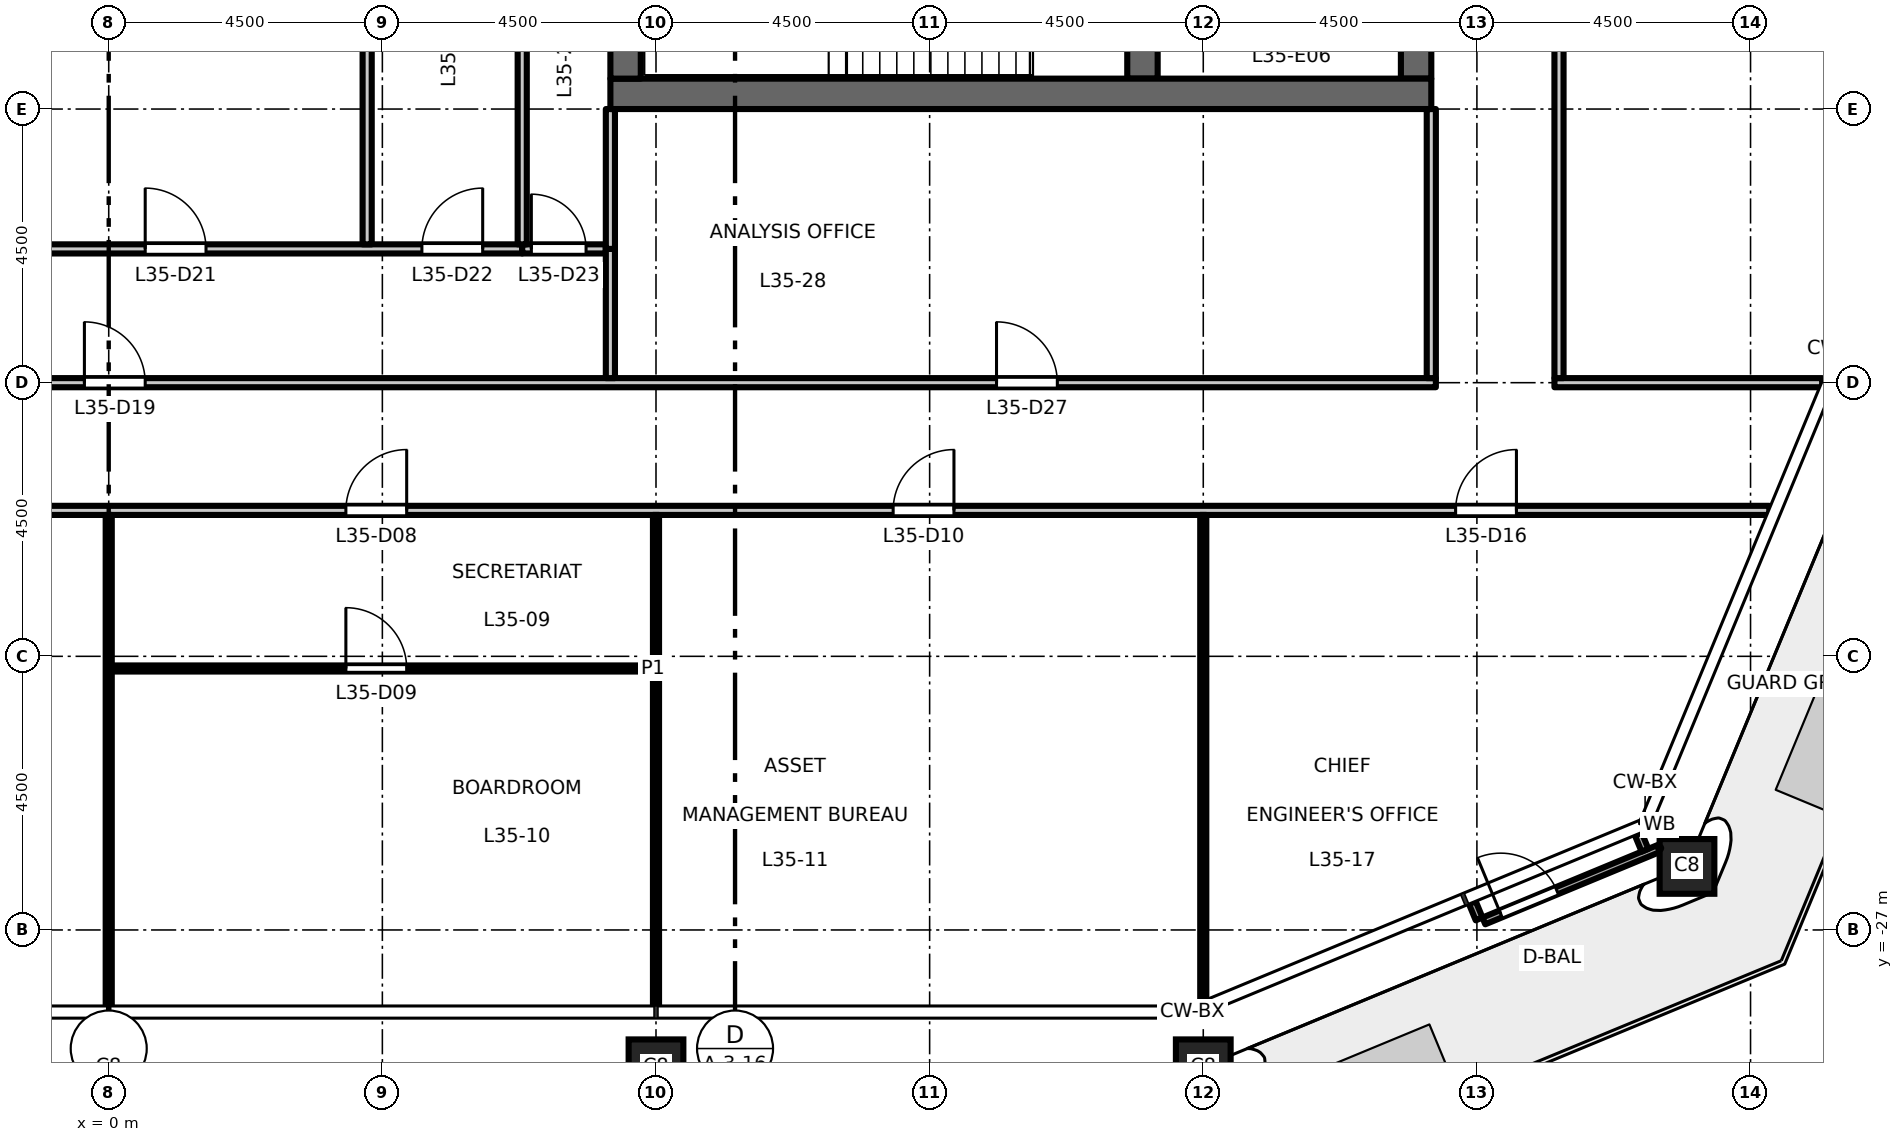
"""IFC4 building model, lengths in metres.
Left out: names, types, materials, properties, quantities, classifications, styles, units other than length and angle.
Written with IfcOpenShell. Run it as: python <this file> out.ifc"""

import sys

from ifc_helpers import new_model, si_unit, direction, frame, frame_2d, origin, origin_2d, place, context, subcontext, project, spatial, rectangle, hollow_rectangle, extrude, element, fill, save


model = new_model("IFC4")
c1 = context("Model", 3, precision=1e-05, world=origin(), true_north=direction((0.0, 1.0)))
c2 = subcontext(c1, "Body", "Model", "MODEL_VIEW")
j1 = project(units=[si_unit("LENGTHUNIT", "METRE"), si_unit("PLANEANGLEUNIT", "RADIAN")], contexts=[c1])
p1 = place(None, origin())
s1 = spatial("IfcSite", under=j1, at=p1, CompositionType="ELEMENT")
p2 = place(p1, origin())
s2 = spatial("IfcBuilding", under=s1, at=p2, CompositionType="ELEMENT")
p3 = place(p2, frame((0.0, 0.0, 163.2)))
s3 = spatial("IfcBuildingStorey", under=s2, at=p3, CompositionType="ELEMENT", Elevation=163.2)
for number, where, z_axis, x_axis in (
    (1, (0.0, -29.25, 0.0), (0.0, 0.0, 1.0), (1.0, 0.0, 0.0)),
    (2, (9.0, -29.25, 0.0), (0.0, 0.0, 1.0), (1.0, 0.0, 0.0)),
    (3, (18.0, -29.25, 0.0), (0.0, 0.0, 1.0), (1.0, 0.0, 0.0)),
    (4, (25.955, -25.955, 0.0), (0.0, 0.0, 1.0), (1.0, 0.0, 0.0)),
):
    element("IfcColumn", number, at=place(p3, frame(where, z_axis=z_axis, x_axis=x_axis)), inside=s3, PredefinedType="COLUMN", context=c2, shape_type="SweptSolid", body=[
        extrude(hollow_rectangle(XDim=0.9, YDim=0.9, WallThickness=0.05, at=origin_2d()), origin(), (0.0, 0.0, 1.0), 4.5),
    ])
p4 = place(p3, frame((21.5, -13.0, 0.0), z_axis=(0.0, 0.0, 1.0), x_axis=(0.0, 1.0, 0.0)))
e5 = element("IfcWall", 5, at=p4, inside=s3, PredefinedType="SHEAR", context=c2, shape_type="SweptSolid", body=[
    extrude(rectangle(XDim=26.0, YDim=0.5, at=frame_2d((13.0, 0.0))), origin(), (0.0, 0.0, 1.0), 4.35),
])
p5 = place(p4, frame((16.825, 0.0, 0.0)))
e6 = element("IfcOpeningElement", 6, at=p5, cuts=e5, PredefinedType="OPENING", context=c2, shape_type="SweptSolid", body=[
    extrude(rectangle(XDim=1.8, YDim=2.1, at=frame_2d((0.9, 1.05))), frame((0.0, 0.26, 0.0), z_axis=(0.0, -1.0, 0.0), x_axis=(1.0, 0.0, 0.0)), (0.0, 0.0, 1.0), 0.52),
])
p6 = place(p4, frame((7.375, 0.0, 0.0)))
e7 = element("IfcOpeningElement", 7, at=p6, cuts=e5, PredefinedType="OPENING", context=c2, shape_type="SweptSolid", body=[
    extrude(rectangle(XDim=1.8, YDim=2.1, at=frame_2d((0.9, 1.05))), frame((0.0, 0.26, 0.0), z_axis=(0.0, -1.0, 0.0), x_axis=(1.0, 0.0, 0.0)), (0.0, 0.0, 1.0), 0.52),
])
p7 = place(p4, frame((22.45, 0.0, 0.0)))
e8 = element("IfcOpeningElement", 8, at=p7, cuts=e5, PredefinedType="OPENING", context=c2, shape_type="SweptSolid", body=[
    extrude(rectangle(XDim=0.9, YDim=2.1, at=frame_2d((0.45, 1.05))), frame((0.0, 0.26, 0.0), z_axis=(0.0, -1.0, 0.0), x_axis=(1.0, 0.0, 0.0)), (0.0, 0.0, 1.0), 0.52),
])
p8 = place(p4, frame((1.7, 0.0, 0.0)))
e9 = element("IfcOpeningElement", 9, at=p8, cuts=e5, PredefinedType="OPENING", context=c2, shape_type="SweptSolid", body=[
    extrude(rectangle(XDim=0.9, YDim=2.1, at=frame_2d((0.45, 1.05))), frame((0.0, 0.26, 0.0), z_axis=(0.0, -1.0, 0.0), x_axis=(1.0, 0.0, 0.0)), (0.0, 0.0, 1.0), 0.52),
])
p9 = place(p3, frame((17.0, -13.0, 0.0), z_axis=(0.0, 0.0, 1.0), x_axis=(0.0, 1.0, 0.0)))
e10 = element("IfcWall", 10, at=p9, inside=s3, PredefinedType="SHEAR", context=c2, shape_type="SweptSolid", body=[
    extrude(rectangle(XDim=6.575, YDim=0.5, at=frame_2d((3.288, 0.0))), origin(), (0.0, 0.0, 1.0), 4.35),
])
p10 = place(p3, frame((8.25, -13.25, 0.0), z_axis=(0.0, 0.0, 1.0), x_axis=(1.0, 0.0, 0.0)))
e11 = element("IfcWall", 11, at=p10, inside=s3, PredefinedType="SHEAR", context=c2, shape_type="SweptSolid", body=[
    extrude(rectangle(XDim=13.5, YDim=0.5, at=frame_2d((6.75, 0.0))), origin(), (0.0, 0.0, 1.0), 4.35),
])
p11 = place(p3, frame((8.5, -13.0, 0.0), z_axis=(0.0, 0.0, 1.0), x_axis=(0.0, 1.0, 0.0)))
e12 = element("IfcWall", 12, at=p11, inside=s3, PredefinedType="SHEAR", context=c2, shape_type="SweptSolid", body=[
    extrude(rectangle(XDim=26.0, YDim=0.5, at=frame_2d((13.0, 0.0))), origin(), (0.0, 0.0, 1.0), 4.35),
])
for number, where, z_axis, x_axis in (
    (13, (22.425, -26.551, 0.0), (0.0, 0.0, 1.0), (0.382, -0.924, 0.0)),
    (14, (25.153, -25.421, 0.0), (0.0, 0.0, 1.0), (0.383, -0.924, 0.0)),
):
    element("IfcWall", number, at=place(p3, frame(where, z_axis=z_axis, x_axis=x_axis)), inside=s3, PredefinedType="STANDARD", context=c2, shape_type="SweptSolid", body=[
        extrude(rectangle(XDim=0.29, YDim=0.12, at=frame_2d((0.145, 0.0))), origin(), (0.0, 0.0, 1.0), 4.35),
    ])
p12 = place(p3, frame((22.615, -26.852, 0.0), z_axis=(0.0, 0.0, 1.0), x_axis=(0.923876066186, 0.382691800707, 0.0)))
e15 = element("IfcWall", 15, at=p12, inside=s3, PredefinedType="STANDARD", context=c2, shape_type="SweptSolid", body=[
    extrude(rectangle(XDim=3.128, YDim=0.12, at=frame_2d((1.564, 0.0))), origin(), (0.0, 0.0, 1.0), 4.35),
])
p13 = place(p12, frame((0.3, 0.0, 0.0)))
e16 = element("IfcOpeningElement", 16, at=p13, cuts=e15, PredefinedType="OPENING", context=c2, shape_type="SweptSolid", body=[
    extrude(rectangle(XDim=1.0, YDim=2.4, at=frame_2d((0.5, 1.2))), frame((0.0, 0.07, 0.0), z_axis=(0.0, -1.0, 0.0), x_axis=(1.0, 0.0, 0.0)), (0.0, 0.0, 1.0), 0.14),
])
p14 = place(p3, frame((0.05, -22.7, 0.0), z_axis=(0.0, 0.0, 1.0), x_axis=(1.0, 0.0, 0.0)))
e17 = element("IfcWall", 17, at=p14, inside=s3, PredefinedType="PARTITIONING", context=c2, shape_type="SweptSolid", body=[
    extrude(rectangle(XDim=8.9, YDim=0.1, at=frame_2d((4.45, 0.0))), origin(), (0.0, 0.0, 1.0), 4.35),
])
p15 = place(p14, frame((3.85, 0.0, 0.0)))
e18 = element("IfcOpeningElement", 18, at=p15, cuts=e17, PredefinedType="OPENING", context=c2, shape_type="SweptSolid", body=[
    extrude(rectangle(XDim=1.0, YDim=2.1, at=frame_2d((0.5, 1.05))), frame((0.0, 0.06, 0.0), z_axis=(0.0, -1.0, 0.0), x_axis=(1.0, 0.0, 0.0)), (0.0, 0.0, 1.0), 0.12),
])
p16 = place(p3, frame((-27.308, -20.1, 0.0), z_axis=(0.0, 0.0, 1.0), x_axis=(1.0, 0.0, 0.0)))
e19 = element("IfcWall", 19, at=p16, inside=s3, PredefinedType="PARTITIONING", context=c2, shape_type="SweptSolid", body=[
    extrude(rectangle(XDim=54.616, YDim=0.15, at=frame_2d((27.308, 0.0))), origin(), (0.0, 0.0, 1.0), 4.35),
])
p17 = place(p16, frame((13.208, 0.0, 0.0)))
e20 = element("IfcOpeningElement", 20, at=p17, cuts=e19, PredefinedType="OPENING", context=c2, shape_type="SweptSolid", body=[
    extrude(rectangle(XDim=1.0, YDim=2.1, at=frame_2d((0.5, 1.05))), frame((0.0, 0.085, 0.0), z_axis=(0.0, -1.0, 0.0), x_axis=(1.0, 0.0, 0.0)), (0.0, 0.0, 1.0), 0.17),
])
p18 = place(p16, frame((22.208, 0.0, 0.0)))
e21 = element("IfcOpeningElement", 21, at=p18, cuts=e19, PredefinedType="OPENING", context=c2, shape_type="SweptSolid", body=[
    extrude(rectangle(XDim=1.0, YDim=2.1, at=frame_2d((0.5, 1.05))), frame((0.0, 0.085, 0.0), z_axis=(0.0, -1.0, 0.0), x_axis=(1.0, 0.0, 0.0)), (0.0, 0.0, 1.0), 0.17),
])
p19 = place(p16, frame((31.208, 0.0, 0.0)))
e22 = element("IfcOpeningElement", 22, at=p19, cuts=e19, PredefinedType="OPENING", context=c2, shape_type="SweptSolid", body=[
    extrude(rectangle(XDim=1.0, YDim=2.1, at=frame_2d((0.5, 1.05))), frame((0.0, 0.085, 0.0), z_axis=(0.0, -1.0, 0.0), x_axis=(1.0, 0.0, 0.0)), (0.0, 0.0, 1.0), 0.17),
])
p20 = place(p16, frame((40.208, 0.0, 0.0)))
e23 = element("IfcOpeningElement", 23, at=p20, cuts=e19, PredefinedType="OPENING", context=c2, shape_type="SweptSolid", body=[
    extrude(rectangle(XDim=1.0, YDim=2.1, at=frame_2d((0.5, 1.05))), frame((0.0, 0.085, 0.0), z_axis=(0.0, -1.0, 0.0), x_axis=(1.0, 0.0, 0.0)), (0.0, 0.0, 1.0), 0.17),
])
p21 = place(p16, frame((4.15, 0.0, 0.0)))
e24 = element("IfcOpeningElement", 24, at=p21, cuts=e19, PredefinedType="OPENING", context=c2, shape_type="SweptSolid", body=[
    extrude(rectangle(XDim=1.0, YDim=2.1, at=frame_2d((0.5, 1.05))), frame((0.0, 0.085, 0.0), z_axis=(0.0, -1.0, 0.0), x_axis=(1.0, 0.0, 0.0)), (0.0, 0.0, 1.0), 0.17),
])
p22 = place(p16, frame((49.458, 0.0, 0.0)))
e25 = element("IfcOpeningElement", 25, at=p22, cuts=e19, PredefinedType="OPENING", context=c2, shape_type="SweptSolid", body=[
    extrude(rectangle(XDim=1.0, YDim=2.1, at=frame_2d((0.5, 1.05))), frame((0.0, 0.085, 0.0), z_axis=(0.0, -1.0, 0.0), x_axis=(1.0, 0.0, 0.0)), (0.0, 0.0, 1.0), 0.17),
])
p23 = place(p3, frame((-21.825, -18.0, 0.0), z_axis=(0.0, 0.0, 1.0), x_axis=(1.0, 0.0, 0.0)))
e26 = element("IfcWall", 26, at=p23, inside=s3, PredefinedType="PARTITIONING", context=c2, shape_type="SweptSolid", body=[
    extrude(rectangle(XDim=43.65, YDim=0.15, at=frame_2d((21.825, 0.0))), origin(), (0.0, 0.0, 1.0), 4.35),
])
p24 = place(p23, frame((21.425, 0.0, 0.0)))
e27 = element("IfcOpeningElement", 27, at=p24, cuts=e26, PredefinedType="OPENING", context=c2, shape_type="SweptSolid", body=[
    extrude(rectangle(XDim=1.0, YDim=2.1, at=frame_2d((0.5, 1.05))), frame((0.0, 0.085, 0.0), z_axis=(0.0, -1.0, 0.0), x_axis=(1.0, 0.0, 0.0)), (0.0, 0.0, 1.0), 0.17),
])
p25 = place(p23, frame((6.425, 0.0, 0.0)))
e28 = element("IfcOpeningElement", 28, at=p25, cuts=e26, PredefinedType="OPENING", context=c2, shape_type="SweptSolid", body=[
    extrude(rectangle(XDim=1.0, YDim=2.1, at=frame_2d((0.5, 1.05))), frame((0.0, 0.085, 0.0), z_axis=(0.0, -1.0, 0.0), x_axis=(1.0, 0.0, 0.0)), (0.0, 0.0, 1.0), 0.17),
])
p26 = place(p23, frame((36.425, 0.0, 0.0)))
e29 = element("IfcOpeningElement", 29, at=p26, cuts=e26, PredefinedType="OPENING", context=c2, shape_type="SweptSolid", body=[
    extrude(rectangle(XDim=1.0, YDim=2.1, at=frame_2d((0.5, 1.05))), frame((0.0, 0.085, 0.0), z_axis=(0.0, -1.0, 0.0), x_axis=(1.0, 0.0, 0.0)), (0.0, 0.0, 1.0), 0.17),
])
p27 = place(p3, frame((23.775, -18.0, 0.0), z_axis=(0.0, 0.0, 1.0), x_axis=(1.0, 0.0, 0.0)))
e30 = element("IfcWall", 30, at=p27, inside=s3, PredefinedType="PARTITIONING", context=c2, shape_type="SweptSolid", body=[
    extrude(rectangle(XDim=4.403, YDim=0.15, at=frame_2d((2.202, 0.0))), origin(), (0.0, 0.0, 1.0), 4.35),
])
p28 = place(p3, frame((-8.175, -15.8, 0.0), z_axis=(0.0, 0.0, 1.0), x_axis=(1.0, 0.0, 0.0)))
e31 = element("IfcWall", 31, at=p28, inside=s3, PredefinedType="PARTITIONING", context=c2, shape_type="SweptSolid", body=[
    extrude(rectangle(XDim=14.975, YDim=0.15, at=frame_2d((7.488, 0.0))), origin(), (0.0, 0.0, 1.0), 4.35),
])
p29 = place(p28, frame((2.525, 0.0, 0.0)))
e32 = element("IfcOpeningElement", 32, at=p29, cuts=e31, PredefinedType="OPENING", context=c2, shape_type="SweptSolid", body=[
    extrude(rectangle(XDim=1.0, YDim=2.1, at=frame_2d((0.5, 1.05))), frame((0.0, 0.085, 0.0), z_axis=(0.0, -1.0, 0.0), x_axis=(1.0, 0.0, 0.0)), (0.0, 0.0, 1.0), 0.17),
])
p30 = place(p28, frame((8.775, 0.0, 0.0)))
e33 = element("IfcOpeningElement", 33, at=p30, cuts=e31, PredefinedType="OPENING", context=c2, shape_type="SweptSolid", body=[
    extrude(rectangle(XDim=1.0, YDim=2.1, at=frame_2d((0.5, 1.05))), frame((0.0, 0.085, 0.0), z_axis=(0.0, -1.0, 0.0), x_axis=(1.0, 0.0, 0.0)), (0.0, 0.0, 1.0), 0.17),
])
p31 = place(p28, frame((13.325, 0.0, 0.0)))
e34 = element("IfcOpeningElement", 34, at=p31, cuts=e31, PredefinedType="OPENING", context=c2, shape_type="SweptSolid", body=[
    extrude(rectangle(XDim=1.0, YDim=2.1, at=frame_2d((0.5, 1.05))), frame((0.0, 0.085, 0.0), z_axis=(0.0, -1.0, 0.0), x_axis=(1.0, 0.0, 0.0)), (0.0, 0.0, 1.0), 0.17),
])
p32 = place(p3, frame((6.8, -15.8, 0.0), z_axis=(0.0, 0.0, 1.0), x_axis=(1.0, 0.0, 0.0)))
e35 = element("IfcWall", 35, at=p32, inside=s3, PredefinedType="PARTITIONING", context=c2, shape_type="SweptSolid", body=[
    extrude(rectangle(XDim=1.375, YDim=0.15, at=frame_2d((0.688, 0.0))), origin(), (0.0, 0.0, 1.0), 4.35),
])
p33 = place(p32, frame((0.15, 0.0, 0.0)))
e36 = element("IfcOpeningElement", 36, at=p33, cuts=e35, PredefinedType="OPENING", context=c2, shape_type="SweptSolid", body=[
    extrude(rectangle(XDim=0.9, YDim=2.1, at=frame_2d((0.45, 1.05))), frame((0.0, 0.085, 0.0), z_axis=(0.0, -1.0, 0.0), x_axis=(1.0, 0.0, 0.0)), (0.0, 0.0, 1.0), 0.17),
])
p34 = place(p3, frame((0.0, -28.26, 0.0), z_axis=(0.0, 0.0, 1.0), x_axis=(0.0, 1.0, 0.0)))
e37 = element("IfcWall", 37, at=p34, inside=s3, PredefinedType="PARTITIONING", context=c2, shape_type="SweptSolid", body=[
    extrude(rectangle(XDim=8.085, YDim=0.1, at=frame_2d((4.042, 0.0))), origin(), (0.0, 0.0, 1.0), 3.45),
])
p35 = place(p3, frame((4.25, -15.725, 0.0), z_axis=(0.0, 0.0, 1.0), x_axis=(0.0, 1.0, 0.0)))
e38 = element("IfcWall", 38, at=p35, inside=s3, PredefinedType="PARTITIONING", context=c2, shape_type="SweptSolid", body=[
    extrude(rectangle(XDim=7.355, YDim=0.15, at=frame_2d((3.677, 0.0))), origin(), (0.0, 0.0, 1.0), 4.35),
])
p36 = place(p3, frame((6.8, -15.725, 0.0), z_axis=(0.0, 0.0, 1.0), x_axis=(0.0, 1.0, 0.0)))
e39 = element("IfcWall", 39, at=p36, inside=s3, PredefinedType="PARTITIONING", context=c2, shape_type="SweptSolid", body=[
    extrude(rectangle(XDim=7.656, YDim=0.15, at=frame_2d((3.828, 0.0))), origin(), (0.0, 0.0, 1.0), 4.35),
])
p37 = place(p3, frame((8.25, -17.925, 0.0), z_axis=(0.0, 0.0, 1.0), x_axis=(0.0, 1.0, 0.0)))
e40 = element("IfcWall", 40, at=p37, inside=s3, PredefinedType="PARTITIONING", context=c2, shape_type="SweptSolid", body=[
    extrude(rectangle(XDim=2.125, YDim=0.15, at=frame_2d((1.062, 0.0))), origin(), (0.0, 0.0, 1.0), 4.35),
])
p38 = place(p3, frame((8.25, -15.8, 0.0), z_axis=(0.0, 0.0, 1.0), x_axis=(0.0, 1.0, 0.0)))
e41 = element("IfcWall", 41, at=p38, inside=s3, PredefinedType="PARTITIONING", context=c2, shape_type="SweptSolid", body=[
    extrude(rectangle(XDim=2.3, YDim=0.15, at=frame_2d((1.15, 0.0))), origin(), (0.0, 0.0, 1.0), 4.35),
])
p39 = place(p3, frame((9.0, -28.26, 0.0), z_axis=(0.0, 0.0, 1.0), x_axis=(0.0, 1.0, 0.0)))
e42 = element("IfcWall", 42, at=p39, inside=s3, PredefinedType="PARTITIONING", context=c2, shape_type="SweptSolid", body=[
    extrude(rectangle(XDim=8.085, YDim=0.1, at=frame_2d((4.042, 0.0))), origin(), (0.0, 0.0, 1.0), 3.45),
])
p40 = place(p3, frame((18.0, -28.178, 0.0), z_axis=(0.0, 0.0, 1.0), x_axis=(0.0, 1.0, 0.0)))
e43 = element("IfcWall", 43, at=p40, inside=s3, PredefinedType="PARTITIONING", context=c2, shape_type="SweptSolid", body=[
    extrude(rectangle(XDim=8.003, YDim=0.1, at=frame_2d((4.001, 0.0))), origin(), (0.0, 0.0, 1.0), 3.45),
])
p41 = place(p3, frame((21.75, -17.925, 0.0), z_axis=(0.0, 0.0, 1.0), x_axis=(0.0, 1.0, 0.0)))
e44 = element("IfcWall", 44, at=p41, inside=s3, PredefinedType="PARTITIONING", context=c2, shape_type="SweptSolid", body=[
    extrude(rectangle(XDim=4.425, YDim=0.15, at=frame_2d((2.212, 0.0))), origin(), (0.0, 0.0, 1.0), 4.35),
])
p42 = place(p3, frame((23.85, -17.925, 0.0), z_axis=(0.0, 0.0, 1.0), x_axis=(0.0, 1.0, 0.0)))
e45 = element("IfcWall", 45, at=p42, inside=s3, PredefinedType="PARTITIONING", context=c2, shape_type="SweptSolid", body=[
    extrude(rectangle(XDim=35.85, YDim=0.15, at=frame_2d((17.925, 0.0))), origin(), (0.0, 0.0, 1.0), 4.35),
])
p43 = place(p42, frame((17.325, 0.0, 0.0)))
e46 = element("IfcOpeningElement", 46, at=p43, cuts=e45, PredefinedType="OPENING", context=c2, shape_type="SweptSolid", body=[
    extrude(rectangle(XDim=1.0, YDim=2.1, at=frame_2d((0.5, 1.05))), frame((0.0, 0.085, 0.0), z_axis=(0.0, -1.0, 0.0), x_axis=(1.0, 0.0, 0.0)), (0.0, 0.0, 1.0), 0.17),
])
p44 = place(p13, origin())
e47 = element("IfcDoor", 47, at=p44, inside=s3, OperationType="SINGLE_SWING_LEFT", PredefinedType="DOOR", context=c2, shape_type="SweptSolid", body=[
    extrude(rectangle(XDim=1.0, YDim=2.4, at=frame_2d((0.5, 1.2))), frame((0.0, 0.025, 0.0), z_axis=(0.0, -1.0, 0.0), x_axis=(1.0, 0.0, 0.0)), (0.0, 0.0, 1.0), 0.05),
])
fill(e16, e47)
p45 = place(p19, origin())
e48 = element("IfcDoor", 48, at=p45, inside=s3, OperationType="SINGLE_SWING_RIGHT", PredefinedType="DOOR", context=c2, shape_type="SweptSolid", body=[
    extrude(rectangle(XDim=1.0, YDim=2.1, at=frame_2d((0.5, 1.05))), frame((0.0, 0.025, 0.0), z_axis=(0.0, -1.0, 0.0), x_axis=(1.0, 0.0, 0.0)), (0.0, 0.0, 1.0), 0.05),
])
fill(e22, e48)
p46 = place(p15, origin())
e49 = element("IfcDoor", 49, at=p46, inside=s3, OperationType="SINGLE_SWING_LEFT", PredefinedType="DOOR", context=c2, shape_type="SweptSolid", body=[
    extrude(rectangle(XDim=1.0, YDim=2.1, at=frame_2d((0.5, 1.05))), frame((0.0, 0.025, 0.0), z_axis=(0.0, -1.0, 0.0), x_axis=(1.0, 0.0, 0.0)), (0.0, 0.0, 1.0), 0.05),
])
fill(e18, e49)
p47 = place(p20, origin())
e50 = element("IfcDoor", 50, at=p47, inside=s3, OperationType="SINGLE_SWING_RIGHT", PredefinedType="DOOR", context=c2, shape_type="SweptSolid", body=[
    extrude(rectangle(XDim=1.0, YDim=2.1, at=frame_2d((0.5, 1.05))), frame((0.0, 0.025, 0.0), z_axis=(0.0, -1.0, 0.0), x_axis=(1.0, 0.0, 0.0)), (0.0, 0.0, 1.0), 0.05),
])
fill(e23, e50)
p48 = place(p22, origin())
e51 = element("IfcDoor", 51, at=p48, inside=s3, OperationType="SINGLE_SWING_RIGHT", PredefinedType="DOOR", context=c2, shape_type="SweptSolid", body=[
    extrude(rectangle(XDim=1.0, YDim=2.1, at=frame_2d((0.5, 1.05))), frame((0.0, 0.025, 0.0), z_axis=(0.0, -1.0, 0.0), x_axis=(1.0, 0.0, 0.0)), (0.0, 0.0, 1.0), 0.05),
])
fill(e25, e51)
p49 = place(p24, origin())
e52 = element("IfcDoor", 52, at=p49, inside=s3, OperationType="SINGLE_SWING_LEFT", PredefinedType="DOOR", context=c2, shape_type="SweptSolid", body=[
    extrude(rectangle(XDim=1.0, YDim=2.1, at=frame_2d((0.5, 1.05))), frame((0.0, 0.025, 0.0), z_axis=(0.0, -1.0, 0.0), x_axis=(1.0, 0.0, 0.0)), (0.0, 0.0, 1.0), 0.05),
])
fill(e27, e52)
p50 = place(p30, origin())
e53 = element("IfcDoor", 53, at=p50, inside=s3, OperationType="SINGLE_SWING_LEFT", PredefinedType="DOOR", context=c2, shape_type="SweptSolid", body=[
    extrude(rectangle(XDim=1.0, YDim=2.1, at=frame_2d((0.5, 1.05))), frame((0.0, 0.025, 0.0), z_axis=(0.0, -1.0, 0.0), x_axis=(1.0, 0.0, 0.0)), (0.0, 0.0, 1.0), 0.05),
])
fill(e33, e53)
p51 = place(p31, origin())
e54 = element("IfcDoor", 54, at=p51, inside=s3, OperationType="SINGLE_SWING_RIGHT", PredefinedType="DOOR", context=c2, shape_type="SweptSolid", body=[
    extrude(rectangle(XDim=1.0, YDim=2.1, at=frame_2d((0.5, 1.05))), frame((0.0, 0.025, 0.0), z_axis=(0.0, -1.0, 0.0), x_axis=(1.0, 0.0, 0.0)), (0.0, 0.0, 1.0), 0.05),
])
fill(e34, e54)
p52 = place(p33, origin())
e55 = element("IfcDoor", 55, at=p52, inside=s3, OperationType="SINGLE_SWING_LEFT", PredefinedType="DOOR", context=c2, shape_type="SweptSolid", body=[
    extrude(rectangle(XDim=0.9, YDim=2.1, at=frame_2d((0.45, 1.05))), frame((0.0, 0.025, 0.0), z_axis=(0.0, -1.0, 0.0), x_axis=(1.0, 0.0, 0.0)), (0.0, 0.0, 1.0), 0.05),
])
fill(e36, e55)
p53 = place(p26, origin())
e56 = element("IfcDoor", 56, at=p53, inside=s3, OperationType="SINGLE_SWING_LEFT", PredefinedType="DOOR", context=c2, shape_type="SweptSolid", body=[
    extrude(rectangle(XDim=1.0, YDim=2.1, at=frame_2d((0.5, 1.05))), frame((0.0, 0.025, 0.0), z_axis=(0.0, -1.0, 0.0), x_axis=(1.0, 0.0, 0.0)), (0.0, 0.0, 1.0), 0.05),
])
fill(e29, e56)
save(model, sys.argv[1])
